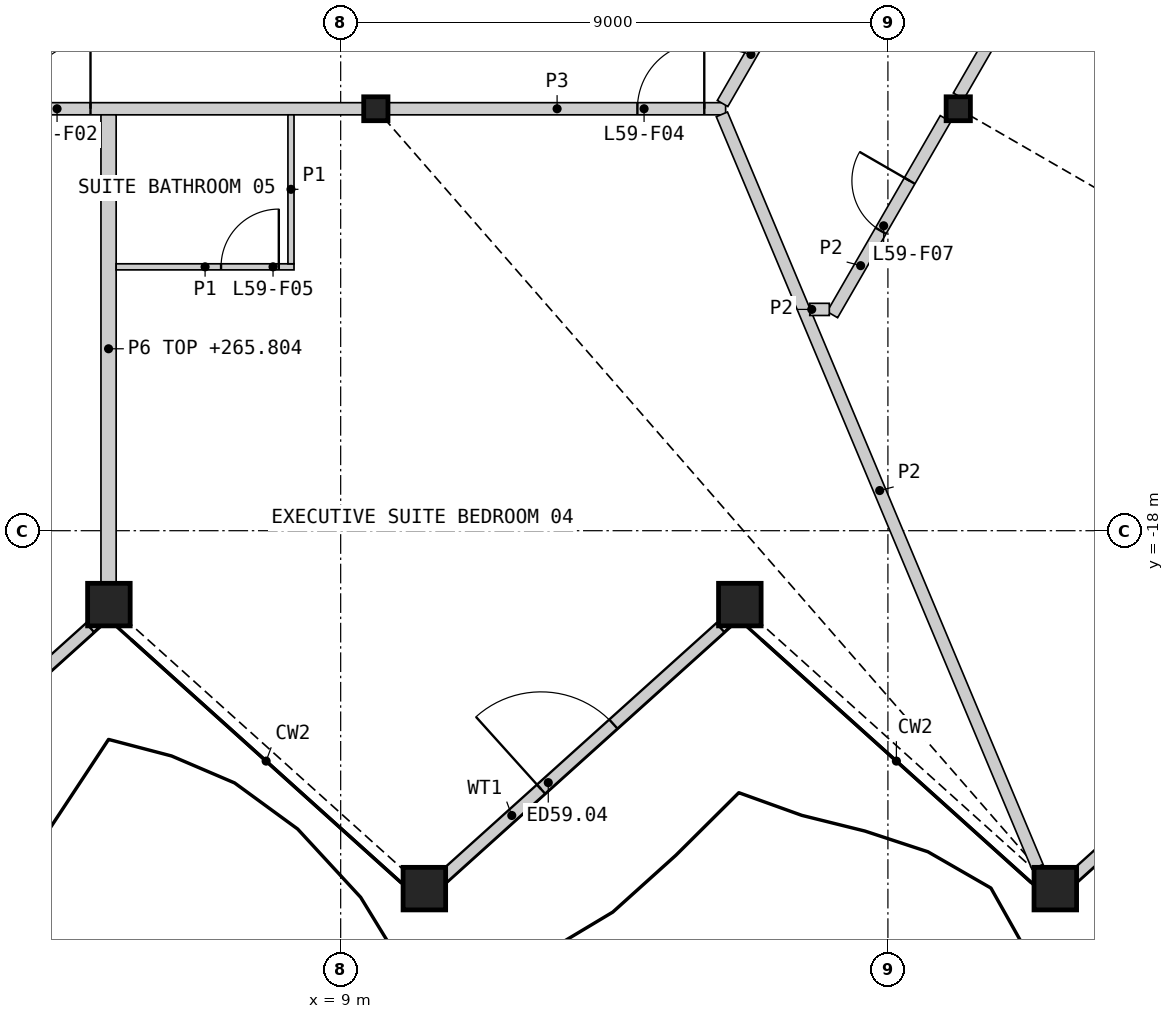
"""IFC4 building model, lengths in metres.
Left out: names, types, materials, properties, quantities, classifications, styles, units other than length and angle.
Written with IfcOpenShell. Run it as: python <this file> out.ifc"""

import sys

from ifc_helpers import new_model, si_unit, direction, frame, frame_2d, origin, origin_2d, place, context, subcontext, project, spatial, rectangle, hollow_rectangle, i_section, extrude, element, fill, save


model = new_model("IFC4")
c1 = context("Model", 3, precision=1e-05, world=origin(), true_north=direction((0.0, 1.0)))
c2 = subcontext(c1, "Body", "Model", "MODEL_VIEW")
j1 = project(units=[si_unit("LENGTHUNIT", "METRE"), si_unit("PLANEANGLEUNIT", "RADIAN")], contexts=[c1])
p1 = place(None, origin())
s1 = spatial("IfcSite", under=j1, at=p1, CompositionType="ELEMENT")
p2 = place(p1, origin())
s2 = spatial("IfcBuilding", under=s1, at=p2, CompositionType="ELEMENT")
p3 = place(p2, frame((0.0, 0.0, 263.4)))
s3 = spatial("IfcBuildingStorey", under=s2, at=p3, CompositionType="ELEMENT", Elevation=263.4)
for number, where, z_axis, x_axis in (
    (1, (5.188, -19.215, 0.0), (0.0, 0.0, 1.0), (1.0, 0.0, 0.0)),
    (2, (10.376, -23.887, 0.0), (0.0, 0.0, 1.0), (1.0, 0.0, 0.0)),
    (3, (15.565, -19.215, 0.0), (0.0, 0.0, 1.0), (1.0, 0.0, 0.0)),
    (4, (20.753, -23.887, 0.0), (0.0, 0.0, 1.0), (1.0, 0.0, 0.0)),
):
    element("IfcColumn", number, at=place(p3, frame(where, z_axis=z_axis, x_axis=x_axis)), inside=s3, PredefinedType="COLUMN", context=c2, shape_type="SweptSolid", body=[
        extrude(hollow_rectangle(XDim=0.7, YDim=0.7, WallThickness=0.045, at=origin_2d()), origin(), (0.0, 0.0, 1.0), 3.6),
    ])
for number, where, z_axis, x_axis in (
    (5, (9.578, -11.06, 0.0), (0.0, 0.0, 1.0), (1.0, 0.0, 0.0)),
    (6, (19.157, -11.06, 0.0), (0.0, 0.0, 1.0), (1.0, 0.0, 0.0)),
):
    element("IfcColumn", number, at=place(p3, frame(where, z_axis=z_axis, x_axis=x_axis)), inside=s3, PredefinedType="COLUMN", context=c2, shape_type="SweptSolid", body=[
        extrude(i_section(OverallWidth=0.399, OverallDepth=0.393, WebThickness=0.023, FlangeThickness=0.037, at=origin_2d()), origin(), (0.0, 0.0, 1.0), 3.6),
    ])
p4 = place(p3, frame((0.305, -23.713, 0.0), z_axis=(0.0, 0.0, 1.0), x_axis=(0.74316789204, 0.669104987458, 0.0)))
e7 = element("IfcWall", 7, at=p4, inside=s3, PredefinedType="SOLIDWALL", context=c2, shape_type="SweptSolid", body=[
    extrude(rectangle(XDim=6.154, YDim=0.2, at=frame_2d((3.077, 0.0))), origin(), (0.0, 0.0, 1.0), 2.701),
])
p5 = place(p4, frame((2.186, 0.0, 0.0)))
e8 = element("IfcOpeningElement", 8, at=p5, cuts=e7, PredefinedType="OPENING", context=c2, shape_type="SweptSolid", body=[
    extrude(rectangle(XDim=1.6, YDim=2.4, at=frame_2d((0.8, 1.2))), frame((0.0, 0.11, 0.0), z_axis=(0.0, -1.0, 0.0), x_axis=(1.0, 0.0, 0.0)), (0.0, 0.0, 1.0), 0.22),
])
p6 = place(p3, frame((10.671, -23.713, 0.0), z_axis=(0.0, 0.0, 1.0), x_axis=(0.74316789204, 0.669104987458, 0.0)))
e9 = element("IfcWall", 9, at=p6, inside=s3, PredefinedType="SOLIDWALL", context=c2, shape_type="SweptSolid", body=[
    extrude(rectangle(XDim=6.154, YDim=0.2, at=frame_2d((3.077, 0.0))), origin(), (0.0, 0.0, 1.0), 2.701),
])
p7 = place(p6, frame((2.186, 0.0, 0.0)))
e10 = element("IfcOpeningElement", 10, at=p7, cuts=e9, PredefinedType="OPENING", context=c2, shape_type="SweptSolid", body=[
    extrude(rectangle(XDim=1.6, YDim=2.4, at=frame_2d((0.8, 1.2))), frame((0.0, 0.11, 0.0), z_axis=(0.0, -1.0, 0.0), x_axis=(1.0, 0.0, 0.0)), (0.0, 0.0, 1.0), 0.22),
])
p8 = place(p3, frame((21.036, -23.713, 0.0), z_axis=(0.0, 0.0, 1.0), x_axis=(0.743142515738, 0.669133171575, 0.0)))
e11 = element("IfcWall", 11, at=p8, inside=s3, PredefinedType="SOLIDWALL", context=c2, shape_type="SweptSolid", body=[
    extrude(rectangle(XDim=6.166, YDim=0.2, at=frame_2d((3.083, 0.0))), origin(), (0.0, 0.0, 1.0), 2.701),
])
p9 = place(p8, frame((2.186, 0.0, 0.0)))
e12 = element("IfcOpeningElement", 12, at=p9, cuts=e11, PredefinedType="OPENING", context=c2, shape_type="SweptSolid", body=[
    extrude(rectangle(XDim=1.6, YDim=2.4, at=frame_2d((0.8, 1.2))), frame((0.0, 0.11, 0.0), z_axis=(0.0, -1.0, 0.0), x_axis=(1.0, 0.0, 0.0)), (0.0, 0.0, 1.0), 0.22),
])
p10 = place(p3, frame((0.209, -11.06, 0.0), z_axis=(0.0, 0.0, 1.0), x_axis=(1.0, 0.0, 0.0)))
e13 = element("IfcWall", 13, at=p10, inside=s3, PredefinedType="PARTITIONING", context=c2, shape_type="SweptSolid", body=[
    extrude(rectangle(XDim=9.159, YDim=0.2, at=frame_2d((4.58, 0.0))), origin(), (0.0, 0.0, 1.0), 3.25),
])
p11 = place(p10, frame((3.576, 0.0, 0.0)))
e14 = element("IfcOpeningElement", 14, at=p11, cuts=e13, PredefinedType="OPENING", context=c2, shape_type="SweptSolid", body=[
    extrude(rectangle(XDim=1.1, YDim=2.1, at=frame_2d((0.55, 1.05))), frame((0.0, 0.11, 0.0), z_axis=(0.0, -1.0, 0.0), x_axis=(1.0, 0.0, 0.0)), (0.0, 0.0, 1.0), 0.22),
])
p12 = place(p3, frame((5.183, -18.855, 0.0), z_axis=(0.0, 0.0, 1.0), x_axis=(0.0, 1.0, 0.0)))
e15 = element("IfcWall", 15, at=p12, inside=s3, PredefinedType="PARTITIONING", context=c2, shape_type="SweptSolid", body=[
    extrude(rectangle(XDim=7.695, YDim=0.25, at=frame_2d((3.848, 0.0))), origin(), (0.0, 0.0, 1.0), 2.404),
])
p13 = place(p3, frame((9.788, -11.06, 0.0), z_axis=(0.0, 0.0, 1.0), x_axis=(1.0, 0.0, 0.0)))
e16 = element("IfcWall", 16, at=p13, inside=s3, PredefinedType="PARTITIONING", context=c2, shape_type="SweptSolid", body=[
    extrude(rectangle(XDim=5.543, YDim=0.2, at=frame_2d((2.771, 0.0))), origin(), (0.0, 0.0, 1.0), 3.25),
])
p14 = place(p13, frame((4.092, 0.0, 0.0)))
e17 = element("IfcOpeningElement", 17, at=p14, cuts=e16, PredefinedType="OPENING", context=c2, shape_type="SweptSolid", body=[
    extrude(rectangle(XDim=1.1, YDim=2.1, at=frame_2d((0.55, 1.05))), frame((0.0, 0.11, 0.0), z_axis=(0.0, -1.0, 0.0), x_axis=(1.0, 0.0, 0.0)), (0.0, 0.0, 1.0), 0.22),
])
p15 = place(p3, frame((15.281, -10.974, 0.0), z_axis=(0.0, 0.0, 1.0), x_axis=(0.499958791762, 0.866049194065, 0.0)))
e18 = element("IfcWall", 18, at=p15, inside=s3, PredefinedType="PARTITIONING", context=c2, shape_type="SweptSolid", body=[
    extrude(rectangle(XDim=3.726, YDim=0.2, at=frame_2d((1.863, 0.0))), origin(), (0.0, 0.0, 1.0), 3.25),
])
p16 = place(p15, frame((1.388, 0.0, 0.0)))
e19 = element("IfcOpeningElement", 19, at=p16, cuts=e18, PredefinedType="OPENING", context=c2, shape_type="SweptSolid", body=[
    extrude(rectangle(XDim=0.95, YDim=2.1, at=frame_2d((0.475, 1.05))), frame((0.0, 0.11, 0.0), z_axis=(0.0, -1.0, 0.0), x_axis=(1.0, 0.0, 0.0)), (0.0, 0.0, 1.0), 0.22),
])
p17 = place(p3, frame((15.27, -11.153, 0.0), z_axis=(0.0, 0.0, 1.0), x_axis=(0.386788567553, -0.922168424969, 0.0)))
e20 = element("IfcWall", 20, at=p17, inside=s3, PredefinedType="PARTITIONING", context=c2, shape_type="SweptSolid", body=[
    extrude(rectangle(XDim=13.419, YDim=0.2, at=frame_2d((6.709, 0.0))), origin(), (0.0, 0.0, 1.0), 2.404),
])
p18 = place(p3, frame((19.162, -10.851, 0.0), z_axis=(0.0, 0.0, 1.0), x_axis=(0.500011000363, 0.866019052629, 0.0)))
e21 = element("IfcWall", 21, at=p18, inside=s3, PredefinedType="PARTITIONING", context=c2, shape_type="SweptSolid", body=[
    extrude(rectangle(XDim=3.784, YDim=0.2, at=frame_2d((1.892, 0.0))), origin(), (0.0, 0.0, 1.0), 2.404),
])
p19 = place(p3, frame((17.086, -14.447, 0.0), z_axis=(0.0, 0.0, 1.0), x_axis=(0.500004411858, 0.866022856582, 0.0)))
e22 = element("IfcWall", 22, at=p19, inside=s3, PredefinedType="PARTITIONING", context=c2, shape_type="SweptSolid", body=[
    extrude(rectangle(XDim=3.723, YDim=0.2, at=frame_2d((1.861, 0.0))), origin(), (0.0, 0.0, 1.0), 2.404),
])
p20 = place(p19, frame((1.593, 0.0, 0.0)))
e23 = element("IfcOpeningElement", 23, at=p20, cuts=e22, PredefinedType="OPENING", context=c2, shape_type="SweptSolid", body=[
    extrude(rectangle(XDim=0.95, YDim=2.1, at=frame_2d((0.475, 1.05))), frame((0.0, 0.11, 0.0), z_axis=(0.0, -1.0, 0.0), x_axis=(1.0, 0.0, 0.0)), (0.0, 0.0, 1.0), 0.22),
])
p21 = place(p3, frame((16.715, -14.36, 0.0), z_axis=(0.0, 0.0, 1.0), x_axis=(1.0, 0.0, 0.0)))
e24 = element("IfcWall", 24, at=p21, inside=s3, PredefinedType="PARTITIONING", context=c2, shape_type="SweptSolid", body=[
    extrude(rectangle(XDim=0.321, YDim=0.2, at=frame_2d((0.161, 0.0))), origin(), (0.0, 0.0, 1.0), 2.404),
])
p22 = place(p3, frame((5.308, -13.66, 0.0), z_axis=(0.0, 0.0, 1.0), x_axis=(1.0, 0.0, 0.0)))
e25 = element("IfcWall", 25, at=p22, inside=s3, PredefinedType="PARTITIONING", context=c2, shape_type="SweptSolid", body=[
    extrude(rectangle(XDim=2.925, YDim=0.1, at=frame_2d((1.462, 0.0))), origin(), (0.0, 0.0, 1.0), 2.404),
])
p23 = place(p22, frame((1.725, 0.0, 0.0)))
e26 = element("IfcOpeningElement", 26, at=p23, cuts=e25, PredefinedType="OPENING", context=c2, shape_type="SweptSolid", body=[
    extrude(rectangle(XDim=0.95, YDim=2.1, at=frame_2d((0.475, 1.05))), frame((0.0, 0.06, 0.0), z_axis=(0.0, -1.0, 0.0), x_axis=(1.0, 0.0, 0.0)), (0.0, 0.0, 1.0), 0.12),
])
p24 = place(p3, frame((8.183, -13.61, 0.0), z_axis=(0.0, 0.0, 1.0), x_axis=(0.0, 1.0, 0.0)))
e27 = element("IfcWall", 27, at=p24, inside=s3, PredefinedType="PARTITIONING", context=c2, shape_type="SweptSolid", body=[
    extrude(rectangle(XDim=2.45, YDim=0.1, at=frame_2d((1.225, 0.0))), origin(), (0.0, 0.0, 1.0), 2.404),
])
p25 = place(p7, origin())
e28 = element("IfcDoor", 28, at=p25, inside=s3, OperationType="DOUBLE_DOOR_SINGLE_SWING", PredefinedType="DOOR", context=c2, shape_type="SweptSolid", body=[
    extrude(rectangle(XDim=1.6, YDim=2.4, at=frame_2d((0.8, 1.2))), frame((0.0, 0.025, 0.0), z_axis=(0.0, -1.0, 0.0), x_axis=(1.0, 0.0, 0.0)), (0.0, 0.0, 1.0), 0.05),
])
fill(e10, e28)
p26 = place(p11, origin())
e29 = element("IfcDoor", 29, at=p26, inside=s3, OperationType="SINGLE_SWING_RIGHT", PredefinedType="DOOR", context=c2, shape_type="SweptSolid", body=[
    extrude(rectangle(XDim=1.1, YDim=2.1, at=frame_2d((0.55, 1.05))), frame((0.0, 0.025, 0.0), z_axis=(0.0, -1.0, 0.0), x_axis=(1.0, 0.0, 0.0)), (0.0, 0.0, 1.0), 0.05),
])
fill(e14, e29)
p27 = place(p14, origin())
e30 = element("IfcDoor", 30, at=p27, inside=s3, OperationType="SINGLE_SWING_RIGHT", PredefinedType="DOOR", context=c2, shape_type="SweptSolid", body=[
    extrude(rectangle(XDim=1.1, YDim=2.1, at=frame_2d((0.55, 1.05))), frame((0.0, 0.025, 0.0), z_axis=(0.0, -1.0, 0.0), x_axis=(1.0, 0.0, 0.0)), (0.0, 0.0, 1.0), 0.05),
])
fill(e17, e30)
p28 = place(p23, origin())
e31 = element("IfcDoor", 31, at=p28, inside=s3, OperationType="SINGLE_SWING_RIGHT", PredefinedType="DOOR", context=c2, shape_type="SweptSolid", body=[
    extrude(rectangle(XDim=0.95, YDim=2.1, at=frame_2d((0.475, 1.05))), frame((0.0, 0.025, 0.0), z_axis=(0.0, -1.0, 0.0), x_axis=(1.0, 0.0, 0.0)), (0.0, 0.0, 1.0), 0.05),
])
fill(e26, e31)
p29 = place(p20, origin())
e32 = element("IfcDoor", 32, at=p29, inside=s3, OperationType="SINGLE_SWING_RIGHT", PredefinedType="DOOR", context=c2, shape_type="SweptSolid", body=[
    extrude(rectangle(XDim=0.95, YDim=2.1, at=frame_2d((0.475, 1.05))), frame((0.0, 0.025, 0.0), z_axis=(0.0, -1.0, 0.0), x_axis=(1.0, 0.0, 0.0)), (0.0, 0.0, 1.0), 0.05),
])
fill(e23, e32)
save(model, sys.argv[1])
